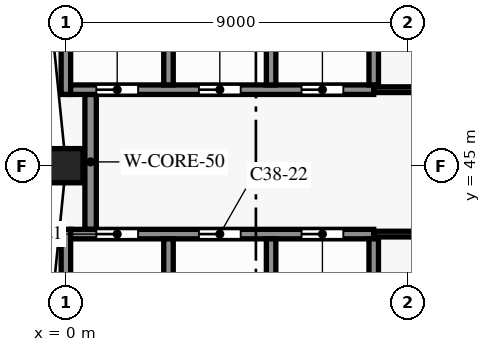
"""IFC4 building model, lengths in metres.
Left out: names, types, materials, properties, quantities, classifications, styles, units other than length and angle.
Written with IfcOpenShell. Run it as: python <this file> out.ifc"""

import sys

from ifc_helpers import new_model, si_unit, direction, frame, frame_2d, origin, origin_2d, place, context, subcontext, project, spatial, rectangle, extrude, element, fill, save


model = new_model("IFC4")
c1 = context("Model", 3, precision=1e-05, world=origin(), true_north=direction((0.0, 1.0)))
c2 = subcontext(c1, "Body", "Model", "MODEL_VIEW")
j1 = project(units=[si_unit("LENGTHUNIT", "METRE"), si_unit("PLANEANGLEUNIT", "RADIAN")], contexts=[c1])
p1 = place(None, origin())
s1 = spatial("IfcSite", under=j1, at=p1, CompositionType="ELEMENT")
p2 = place(p1, origin())
s2 = spatial("IfcBuilding", under=s1, at=p2, CompositionType="ELEMENT")
p3 = place(p2, frame((0.0, 0.0, 275.2)))
s3 = spatial("IfcBuildingStorey", under=s2, at=p3, CompositionType="ELEMENT", Elevation=275.2)
p4 = place(p3, frame((0.0, 45.0, 0.0), z_axis=(0.0, 0.0, 1.0), x_axis=(0.0, -1.0, 0.0)))
e1 = element("IfcColumn", 1, at=p4, inside=s3, PredefinedType="COLUMN", context=c2, shape_type="SweptSolid", body=[
    extrude(rectangle(XDim=0.9, YDim=0.9, at=origin_2d()), origin(), (0.0, 0.0, 1.0), 3.8),
])
p5 = place(p3, frame((8.1, 43.2, 0.0), z_axis=(0.0, 0.0, 1.0), x_axis=(1.0, 0.0, 0.0)))
e2 = element("IfcWall", 2, at=p5, inside=s3, PredefinedType="PARTITIONING", context=c2, shape_type="SweptSolid", body=[
    extrude(rectangle(XDim=16.125, YDim=0.15, at=frame_2d((8.062, 0.0))), origin(), (0.0, 0.0, 1.0), 3.35),
])
p6 = place(p5, frame((5.625, 0.0, 0.0)))
e3 = element("IfcOpeningElement", 3, at=p6, cuts=e2, PredefinedType="OPENING", context=c2, shape_type="SweptSolid", body=[
    extrude(rectangle(XDim=0.9, YDim=2.1, at=frame_2d((0.45, 1.05))), frame((0.0, 0.085, 0.0), z_axis=(0.0, -1.0, 0.0), x_axis=(1.0, 0.0, 0.0)), (0.0, 0.0, 1.0), 0.17),
])
p7 = place(p5, frame((13.725, 0.0, 0.0)))
e4 = element("IfcOpeningElement", 4, at=p7, cuts=e2, PredefinedType="OPENING", context=c2, shape_type="SweptSolid", body=[
    extrude(rectangle(XDim=0.9, YDim=2.1, at=frame_2d((0.45, 1.05))), frame((0.0, 0.085, 0.0), z_axis=(0.0, -1.0, 0.0), x_axis=(1.0, 0.0, 0.0)), (0.0, 0.0, 1.0), 0.17),
])
p8 = place(p3, frame((0.125, 43.2, 0.0), z_axis=(0.0, 0.0, 1.0), x_axis=(1.0, 0.0, 0.0)))
e5 = element("IfcWall", 5, at=p8, inside=s3, PredefinedType="SHEAR", context=c2, shape_type="SweptSolid", body=[
    extrude(rectangle(XDim=7.975, YDim=0.25, at=frame_2d((3.988, 0.0))), origin(), (0.0, 0.0, 1.0), 3.5),
])
p9 = place(p8, frame((0.675, 0.0, 0.0)))
e6 = element("IfcOpeningElement", 6, at=p9, cuts=e5, PredefinedType="OPENING", context=c2, shape_type="SweptSolid", body=[
    extrude(rectangle(XDim=1.1, YDim=2.1, at=frame_2d((0.55, 1.05))), frame((0.0, 0.135, 0.0), z_axis=(0.0, -1.0, 0.0), x_axis=(1.0, 0.0, 0.0)), (0.0, 0.0, 1.0), 0.27),
])
p10 = place(p8, frame((3.375, 0.0, 0.0)))
e7 = element("IfcOpeningElement", 7, at=p10, cuts=e5, PredefinedType="OPENING", context=c2, shape_type="SweptSolid", body=[
    extrude(rectangle(XDim=1.1, YDim=2.1, at=frame_2d((0.55, 1.05))), frame((0.0, 0.135, 0.0), z_axis=(0.0, -1.0, 0.0), x_axis=(1.0, 0.0, 0.0)), (0.0, 0.0, 1.0), 0.27),
])
p11 = place(p8, frame((6.075, 0.0, 0.0)))
e8 = element("IfcOpeningElement", 8, at=p11, cuts=e5, PredefinedType="OPENING", context=c2, shape_type="SweptSolid", body=[
    extrude(rectangle(XDim=1.1, YDim=2.1, at=frame_2d((0.55, 1.05))), frame((0.0, 0.135, 0.0), z_axis=(0.0, -1.0, 0.0), x_axis=(1.0, 0.0, 0.0)), (0.0, 0.0, 1.0), 0.27),
])
p12 = place(p3, frame((8.1, 47.0, 0.0), z_axis=(0.0, 0.0, 1.0), x_axis=(1.0, 0.0, 0.0)))
e9 = element("IfcWall", 9, at=p12, inside=s3, PredefinedType="PARTITIONING", context=c2, shape_type="SweptSolid", body=[
    extrude(rectangle(XDim=13.5, YDim=0.15, at=frame_2d((6.75, 0.0))), origin(), (0.0, 0.0, 1.0), 3.35),
])
p13 = place(p12, frame((4.625, 0.0, 0.0)))
e10 = element("IfcOpeningElement", 10, at=p13, cuts=e9, PredefinedType="OPENING", context=c2, shape_type="SweptSolid", body=[
    extrude(rectangle(XDim=0.9, YDim=2.1, at=frame_2d((0.45, 1.05))), frame((0.0, 0.085, 0.0), z_axis=(0.0, -1.0, 0.0), x_axis=(1.0, 0.0, 0.0)), (0.0, 0.0, 1.0), 0.17),
])
p14 = place(p12, frame((11.375, 0.0, 0.0)))
e11 = element("IfcOpeningElement", 11, at=p14, cuts=e9, PredefinedType="OPENING", context=c2, shape_type="SweptSolid", body=[
    extrude(rectangle(XDim=0.9, YDim=2.1, at=frame_2d((0.45, 1.05))), frame((0.0, 0.085, 0.0), z_axis=(0.0, -1.0, 0.0), x_axis=(1.0, 0.0, 0.0)), (0.0, 0.0, 1.0), 0.17),
])
p15 = place(p3, frame((0.125, 47.0, 0.0), z_axis=(0.0, 0.0, 1.0), x_axis=(1.0, 0.0, 0.0)))
e12 = element("IfcWall", 12, at=p15, inside=s3, PredefinedType="SHEAR", context=c2, shape_type="SweptSolid", body=[
    extrude(rectangle(XDim=7.975, YDim=0.25, at=frame_2d((3.988, 0.0))), origin(), (0.0, 0.0, 1.0), 3.5),
])
p16 = place(p15, frame((0.675, 0.0, 0.0)))
e13 = element("IfcOpeningElement", 13, at=p16, cuts=e12, PredefinedType="OPENING", context=c2, shape_type="SweptSolid", body=[
    extrude(rectangle(XDim=1.1, YDim=2.1, at=frame_2d((0.55, 1.05))), frame((0.0, 0.135, 0.0), z_axis=(0.0, -1.0, 0.0), x_axis=(1.0, 0.0, 0.0)), (0.0, 0.0, 1.0), 0.27),
])
p17 = place(p15, frame((3.375, 0.0, 0.0)))
e14 = element("IfcOpeningElement", 14, at=p17, cuts=e12, PredefinedType="OPENING", context=c2, shape_type="SweptSolid", body=[
    extrude(rectangle(XDim=1.1, YDim=2.1, at=frame_2d((0.55, 1.05))), frame((0.0, 0.135, 0.0), z_axis=(0.0, -1.0, 0.0), x_axis=(1.0, 0.0, 0.0)), (0.0, 0.0, 1.0), 0.27),
])
p18 = place(p15, frame((6.075, 0.0, 0.0)))
e15 = element("IfcOpeningElement", 15, at=p18, cuts=e12, PredefinedType="OPENING", context=c2, shape_type="SweptSolid", body=[
    extrude(rectangle(XDim=1.1, YDim=2.1, at=frame_2d((0.55, 1.05))), frame((0.0, 0.135, 0.0), z_axis=(0.0, -1.0, 0.0), x_axis=(1.0, 0.0, 0.0)), (0.0, 0.0, 1.0), 0.27),
])
p19 = place(p3, frame((0.0, 40.0, 0.0), z_axis=(0.0, 0.0, 1.0), x_axis=(0.0, 1.0, 0.0)))
e16 = element("IfcWall", 16, at=p19, inside=s3, PredefinedType="SHEAR", context=c2, shape_type="SweptSolid", body=[
    extrude(rectangle(XDim=3.325, YDim=0.25, at=frame_2d((1.663, 0.0))), origin(), (0.0, 0.0, 1.0), 3.5),
])
p20 = place(p3, frame((0.0, 46.875, 0.0), z_axis=(0.0, 0.0, 1.0), x_axis=(0.0, 1.0, 0.0)))
e17 = element("IfcWall", 17, at=p20, inside=s3, PredefinedType="SHEAR", context=c2, shape_type="SweptSolid", body=[
    extrude(rectangle(XDim=3.475, YDim=0.25, at=frame_2d((1.738, 0.0))), origin(), (0.0, 0.0, 1.0), 3.5),
])
p21 = place(p3, frame((0.65, 43.325, 0.0), z_axis=(0.0, 0.0, 1.0), x_axis=(0.0, 1.0, 0.0)))
e18 = element("IfcWall", 18, at=p21, inside=s3, PredefinedType="SHEAR", context=c2, shape_type="SweptSolid", body=[
    extrude(rectangle(XDim=3.55, YDim=0.3, at=frame_2d((1.775, 0.0))), origin(), (0.0, 0.0, 1.0), 3.5),
])
for number, where, z_axis, x_axis in (
    (19, (2.7, 40.125, 0.0), (0.0, 0.0, 1.0), (0.0, 1.0, 0.0)),
    (20, (2.7, 47.125, 0.0), (0.0, 0.0, 1.0), (0.0, 1.0, 0.0)),
    (21, (5.4, 40.125, 0.0), (0.0, 0.0, 1.0), (0.0, 1.0, 0.0)),
    (22, (5.4, 47.125, 0.0), (0.0, 0.0, 1.0), (0.0, 1.0, 0.0)),
    (23, (8.1, 40.125, 0.0), (0.0, 0.0, 1.0), (0.0, 1.0, 0.0)),
):
    element("IfcWall", number, at=place(p3, frame(where, z_axis=z_axis, x_axis=x_axis)), inside=s3, PredefinedType="SHEAR", context=c2, shape_type="SweptSolid", body=[
        extrude(rectangle(XDim=2.95, YDim=0.25, at=frame_2d((1.475, 0.0))), origin(), (0.0, 0.0, 1.0), 3.5),
    ])
p22 = place(p3, frame((8.1, 47.125, 0.0), z_axis=(0.0, 0.0, 1.0), x_axis=(0.0, 1.0, 0.0)))
e24 = element("IfcWall", 24, at=p22, inside=s3, PredefinedType="SHEAR", context=c2, shape_type="SweptSolid", body=[
    extrude(rectangle(XDim=3.075, YDim=0.25, at=frame_2d((1.538, 0.0))), origin(), (0.0, 0.0, 1.0), 3.5),
])
p23 = place(p9, origin())
e25 = element("IfcDoor", 25, at=p23, inside=s3, OperationType="DOUBLE_DOOR_SLIDING", PredefinedType="DOOR", context=c2, shape_type="SweptSolid", body=[
    extrude(rectangle(XDim=1.1, YDim=2.1, at=frame_2d((0.55, 1.05))), frame((0.0, 0.025, 0.0), z_axis=(0.0, -1.0, 0.0), x_axis=(1.0, 0.0, 0.0)), (0.0, 0.0, 1.0), 0.05),
])
fill(e6, e25)
p24 = place(p10, origin())
e26 = element("IfcDoor", 26, at=p24, inside=s3, OperationType="DOUBLE_DOOR_SLIDING", PredefinedType="DOOR", context=c2, shape_type="SweptSolid", body=[
    extrude(rectangle(XDim=1.1, YDim=2.1, at=frame_2d((0.55, 1.05))), frame((0.0, 0.025, 0.0), z_axis=(0.0, -1.0, 0.0), x_axis=(1.0, 0.0, 0.0)), (0.0, 0.0, 1.0), 0.05),
])
fill(e7, e26)
p25 = place(p11, origin())
e27 = element("IfcDoor", 27, at=p25, inside=s3, OperationType="DOUBLE_DOOR_SLIDING", PredefinedType="DOOR", context=c2, shape_type="SweptSolid", body=[
    extrude(rectangle(XDim=1.1, YDim=2.1, at=frame_2d((0.55, 1.05))), frame((0.0, 0.025, 0.0), z_axis=(0.0, -1.0, 0.0), x_axis=(1.0, 0.0, 0.0)), (0.0, 0.0, 1.0), 0.05),
])
fill(e8, e27)
p26 = place(p16, origin())
e28 = element("IfcDoor", 28, at=p26, inside=s3, OperationType="DOUBLE_DOOR_SLIDING", PredefinedType="DOOR", context=c2, shape_type="SweptSolid", body=[
    extrude(rectangle(XDim=1.1, YDim=2.1, at=frame_2d((0.55, 1.05))), frame((0.0, 0.025, 0.0), z_axis=(0.0, -1.0, 0.0), x_axis=(1.0, 0.0, 0.0)), (0.0, 0.0, 1.0), 0.05),
])
fill(e13, e28)
p27 = place(p17, origin())
e29 = element("IfcDoor", 29, at=p27, inside=s3, OperationType="DOUBLE_DOOR_SLIDING", PredefinedType="DOOR", context=c2, shape_type="SweptSolid", body=[
    extrude(rectangle(XDim=1.1, YDim=2.1, at=frame_2d((0.55, 1.05))), frame((0.0, 0.025, 0.0), z_axis=(0.0, -1.0, 0.0), x_axis=(1.0, 0.0, 0.0)), (0.0, 0.0, 1.0), 0.05),
])
fill(e14, e29)
p28 = place(p18, origin())
e30 = element("IfcDoor", 30, at=p28, inside=s3, OperationType="DOUBLE_DOOR_SLIDING", PredefinedType="DOOR", context=c2, shape_type="SweptSolid", body=[
    extrude(rectangle(XDim=1.1, YDim=2.1, at=frame_2d((0.55, 1.05))), frame((0.0, 0.025, 0.0), z_axis=(0.0, -1.0, 0.0), x_axis=(1.0, 0.0, 0.0)), (0.0, 0.0, 1.0), 0.05),
])
fill(e15, e30)
save(model, sys.argv[1])
